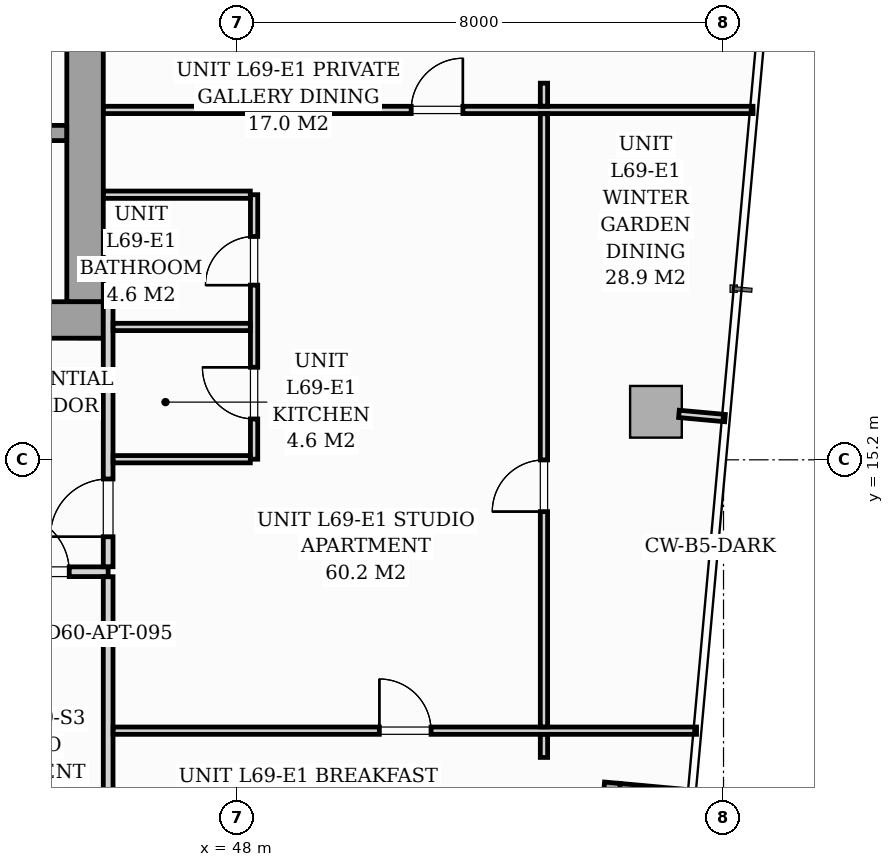
"""IFC4 building model, lengths in metres.
Left out: names, types, materials, properties, quantities, classifications, styles, units other than length and angle.
Written with IfcOpenShell. Run it as: python <this file> out.ifc"""

import sys

from ifc_helpers import new_model, si_unit, direction, frame, frame_2d, origin, origin_2d, place, context, subcontext, project, spatial, rectangle, i_section, extrude, source, transform, mapped, element, fill, save


model = new_model("IFC4")
c1 = context("Model", 3, precision=1e-05, world=origin(), true_north=direction((0.0, 1.0)))
c2 = subcontext(c1, "Body", "Model", "MODEL_VIEW")
j1 = project(units=[si_unit("LENGTHUNIT", "METRE"), si_unit("PLANEANGLEUNIT", "RADIAN")], contexts=[c1])
p1 = place(None, origin())
s1 = spatial("IfcSite", under=j1, at=p1, CompositionType="ELEMENT")
p2 = place(p1, origin())
s2 = spatial("IfcBuilding", under=s1, at=p2, CompositionType="ELEMENT")
p3 = place(p2, frame((0.0, 0.0, 239.7)))
s3 = spatial("IfcBuildingStorey", under=s2, at=p3, CompositionType="ELEMENT", Elevation=239.7)
m1 = source(origin(), c2, "Body", "SweptSolid", [
    extrude(i_section(OverallWidth=0.409, OverallDepth=0.425, WebThickness=0.033, FlangeThickness=0.052, FilletRadius=0.018, at=origin_2d()), origin(), (0.0, 0.0, 1.0), 3.296),
])
p4 = place(p3, frame((45.6, 17.4, 0.002), z_axis=(0.0, 0.0, 1.0), x_axis=(1.0, 0.0, 0.0)))
e1 = element("IfcColumn", 1, at=p4, inside=s3, PredefinedType="PILASTER", context=c2, shape_type="MappedRepresentation", body=[
    mapped(m1, transform((0.0, 0.0, 0.0), scale=1.0)),
])
m2 = source(origin(), c2, "Body", "SweptSolid", [
    extrude(rectangle(XDim=0.85, YDim=0.85, at=origin_2d()), origin(), (0.0, 0.0, 1.0), 3.296),
])
p5 = place(p3, frame((54.889, 15.99, 0.002), z_axis=(0.0, 0.0, 1.0), x_axis=(0.995884398616, -0.090632580198, 0.0)))
e2 = element("IfcColumn", 2, at=p5, inside=s3, PredefinedType="COLUMN", context=c2, shape_type="MappedRepresentation", body=[
    mapped(m2, transform((0.0, 0.0, 0.0), scale=1.0)),
])
for number, where, z_axis, x_axis in (
    (3, (55.665, 9.623, 0.0), (0.0, 0.0, 1.0), (-0.996, 0.091, 0.0)),
    (4, (54.173, 9.889, 0.0), (0.0, 0.0, 1.0), (-0.091, -0.996, 0.0)),
):
    element("IfcWall", number, at=place(p3, frame(where, z_axis=z_axis, x_axis=x_axis)), inside=s3, PredefinedType="STANDARD", context=c2, shape_type="SweptSolid", body=[
        extrude(rectangle(XDim=1.395, YDim=0.26, at=frame_2d((0.698, 0.0))), origin(), (0.0, 0.0, 1.0), 3.04),
    ])
p6 = place(p3, frame((26.2, 17.5, 0.0), z_axis=(0.0, 0.0, 1.0), x_axis=(1.0, 0.0, 0.0)))
e5 = element("IfcWall", 5, at=p6, inside=s3, PredefinedType="SHEAR", context=c2, shape_type="SweptSolid", body=[
    extrude(rectangle(XDim=19.6, YDim=0.6, at=frame_2d((9.8, 0.0))), origin(), (0.0, 0.0, 1.0), 3.3),
])
p7 = place(p6, frame((0.95, 0.0, 0.0)))
e6 = element("IfcOpeningElement", 6, at=p7, cuts=e5, PredefinedType="OPENING", context=c2, shape_type="SweptSolid", body=[
    extrude(rectangle(XDim=0.95, YDim=2.06, at=frame_2d((0.475, 1.03))), frame((0.0, 0.31, 0.0), z_axis=(0.0, -1.0, 0.0), x_axis=(1.0, 0.0, 0.0)), (0.0, 0.0, 1.0), 0.62),
])
p8 = place(p6, frame((9.38, 0.0, 0.0)))
e7 = element("IfcOpeningElement", 7, at=p8, cuts=e5, PredefinedType="OPENING", context=c2, shape_type="SweptSolid", body=[
    extrude(rectangle(XDim=0.85, YDim=2.0, at=frame_2d((0.425, 1.0))), frame((0.0, 0.31, 0.0), z_axis=(0.0, -1.0, 0.0), x_axis=(1.0, 0.0, 0.0)), (0.0, 0.0, 1.0), 0.62),
])
p9 = place(p6, frame((17.55, 0.0, 0.0)))
e8 = element("IfcOpeningElement", 8, at=p9, cuts=e5, PredefinedType="OPENING", context=c2, shape_type="SweptSolid", body=[
    extrude(rectangle(XDim=0.95, YDim=2.06, at=frame_2d((0.475, 1.03))), frame((0.0, 0.31, 0.0), z_axis=(0.0, -1.0, 0.0), x_axis=(1.0, 0.0, 0.0)), (0.0, 0.0, 1.0), 0.62),
])
p10 = place(p3, frame((45.5, 17.802, 0.0), z_axis=(0.0, 0.0, 1.0), x_axis=(0.0, 1.0, 0.0)))
e9 = element("IfcWall", 9, at=p10, inside=s3, PredefinedType="SHEAR", context=c2, shape_type="SweptSolid", body=[
    extrude(rectangle(XDim=5.796, YDim=0.6, at=frame_2d((2.898, 0.0))), origin(), (0.0, 0.0, 1.0), 3.3),
])
p11 = place(p3, frame((37.05, 20.575, 0.0), z_axis=(0.0, 0.0, 1.0), x_axis=(1.0, 0.0, 0.0)))
e10 = element("IfcWall", 10, at=p11, inside=s3, PredefinedType="SOLIDWALL", context=c2, shape_type="SweptSolid", body=[
    extrude(rectangle(XDim=8.148, YDim=0.25, at=frame_2d((4.074, 0.0))), origin(), (0.0, 0.0, 1.0), 3.3),
])
p12 = place(p11, frame((6.6, 0.0, 0.0)))
e11 = element("IfcOpeningElement", 11, at=p12, cuts=e10, PredefinedType="OPENING", context=c2, shape_type="SweptSolid", body=[
    extrude(rectangle(XDim=0.95, YDim=2.06, at=frame_2d((0.475, 1.03))), frame((0.0, 0.135, 0.0), z_axis=(0.0, -1.0, 0.0), x_axis=(1.0, 0.0, 0.0)), (0.0, 0.0, 1.0), 0.27),
])
p13 = place(p3, frame((26.12, 13.36, 0.0), z_axis=(0.0, 0.0, 1.0), x_axis=(1.0, 0.0, 0.0)))
e12 = element("IfcWall", 12, at=p13, inside=s3, PredefinedType="PARTITIONING", context=c2, shape_type="SweptSolid", body=[
    extrude(rectangle(XDim=19.76, YDim=0.16, at=frame_2d((9.88, 0.0))), origin(), (0.0, 0.0, 1.0), 2.605),
])
p14 = place(p13, frame((5.221, 0.0, 0.0)))
e13 = element("IfcOpeningElement", 13, at=p14, cuts=e12, PredefinedType="OPENING", context=c2, shape_type="SweptSolid", body=[
    extrude(rectangle(XDim=0.95, YDim=2.06, at=frame_2d((0.475, 1.03))), frame((0.0, 0.09, 0.0), z_axis=(0.0, -1.0, 0.0), x_axis=(1.0, 0.0, 0.0)), (0.0, 0.0, 1.0), 0.18),
])
p15 = place(p13, frame((8.074, 0.0, 0.0)))
e14 = element("IfcOpeningElement", 14, at=p15, cuts=e12, PredefinedType="OPENING", context=c2, shape_type="SweptSolid", body=[
    extrude(rectangle(XDim=0.95, YDim=2.06, at=frame_2d((0.475, 1.03))), frame((0.0, 0.09, 0.0), z_axis=(0.0, -1.0, 0.0), x_axis=(1.0, 0.0, 0.0)), (0.0, 0.0, 1.0), 0.18),
])
p16 = place(p13, frame((18.17, 0.0, 0.0)))
e15 = element("IfcOpeningElement", 15, at=p16, cuts=e12, PredefinedType="OPENING", context=c2, shape_type="SweptSolid", body=[
    extrude(rectangle(XDim=0.95, YDim=2.06, at=frame_2d((0.475, 1.03))), frame((0.0, 0.09, 0.0), z_axis=(0.0, -1.0, 0.0), x_axis=(1.0, 0.0, 0.0)), (0.0, 0.0, 1.0), 0.18),
])
p17 = place(p3, frame((45.88, 8.136, 0.0), z_axis=(0.0, 0.0, 1.0), x_axis=(0.0, 1.0, 0.0)))
e16 = element("IfcWall", 16, at=p17, inside=s3, PredefinedType="PARTITIONING", context=c2, shape_type="SweptSolid", body=[
    extrude(rectangle(XDim=5.142, YDim=0.16, at=frame_2d((2.571, 0.0))), origin(), (0.0, 0.0, 1.0), 3.04),
])
p18 = place(p3, frame((45.88, 13.442, 0.0), z_axis=(0.0, 0.0, 1.0), x_axis=(0.0, 1.0, 0.0)))
e17 = element("IfcWall", 17, at=p18, inside=s3, PredefinedType="PARTITIONING", context=c2, shape_type="SweptSolid", body=[
    extrude(rectangle(XDim=4.36, YDim=0.16, at=frame_2d((2.18, 0.0))), origin(), (0.0, 0.0, 1.0), 3.04),
])
p19 = place(p18, frame((0.493, 0.0, 0.0)))
e18 = element("IfcOpeningElement", 18, at=p19, cuts=e17, PredefinedType="OPENING", context=c2, shape_type="SweptSolid", body=[
    extrude(rectangle(XDim=0.95, YDim=2.06, at=frame_2d((0.475, 1.03))), frame((0.0, 0.09, 0.0), z_axis=(0.0, -1.0, 0.0), x_axis=(1.0, 0.0, 0.0)), (0.0, 0.0, 1.0), 0.18),
])
p20 = place(p3, frame((48.28, 15.21, 0.0), z_axis=(0.0, 0.0, 1.0), x_axis=(0.0, 1.0, 0.0)))
e19 = element("IfcWall", 19, at=p20, inside=s3, PredefinedType="PARTITIONING", context=c2, shape_type="SweptSolid", body=[
    extrude(rectangle(XDim=4.35, YDim=0.12, at=frame_2d((2.175, 0.0))), origin(), (0.0, 0.0, 1.0), 3.04),
])
p21 = place(p20, frame((0.662, 0.0, 0.0)))
e20 = element("IfcOpeningElement", 20, at=p21, cuts=e19, PredefinedType="OPENING", context=c2, shape_type="SweptSolid", body=[
    extrude(rectangle(XDim=0.85, YDim=2.05, at=frame_2d((0.425, 1.025))), frame((0.0, 0.07, 0.0), z_axis=(0.0, -1.0, 0.0), x_axis=(1.0, 0.0, 0.0)), (0.0, 0.0, 1.0), 0.14),
])
p22 = place(p20, frame((2.863, 0.0, 0.0)))
e21 = element("IfcOpeningElement", 21, at=p22, cuts=e19, PredefinedType="OPENING", context=c2, shape_type="SweptSolid", body=[
    extrude(rectangle(XDim=0.8, YDim=2.02, at=frame_2d((0.4, 1.01))), frame((0.0, 0.07, 0.0), z_axis=(0.0, -1.0, 0.0), x_axis=(1.0, 0.0, 0.0)), (0.0, 0.0, 1.0), 0.14),
])
p23 = place(p3, frame((45.962, 17.385, 0.0), z_axis=(0.0, 0.0, 1.0), x_axis=(1.0, 0.0, 0.0)))
e22 = element("IfcWall", 22, at=p23, inside=s3, PredefinedType="PARTITIONING", context=c2, shape_type="SweptSolid", body=[
    extrude(rectangle(XDim=2.256, YDim=0.12, at=frame_2d((1.128, 0.0))), origin(), (0.0, 0.0, 1.0), 2.381),
])
p24 = place(p3, frame((45.962, 15.21, 0.0), z_axis=(0.0, 0.0, 1.0), x_axis=(1.0, 0.0, 0.0)))
e23 = element("IfcWall", 23, at=p24, inside=s3, PredefinedType="PARTITIONING", context=c2, shape_type="SweptSolid", body=[
    extrude(rectangle(XDim=2.256, YDim=0.12, at=frame_2d((1.128, 0.0))), origin(), (0.0, 0.0, 1.0), 3.04),
])
p25 = place(p3, frame((45.802, 19.56, 0.0), z_axis=(0.0, 0.0, 1.0), x_axis=(1.0, 0.0, 0.0)))
e24 = element("IfcWall", 24, at=p25, inside=s3, PredefinedType="PARTITIONING", context=c2, shape_type="SweptSolid", body=[
    extrude(rectangle(XDim=2.416, YDim=0.12, at=frame_2d((1.208, 0.0))), origin(), (0.0, 0.0, 1.0), 3.04),
])
p26 = place(p3, frame((45.962, 10.746, 0.0), z_axis=(0.0, 0.0, 1.0), x_axis=(1.0, 0.0, 0.0)))
e25 = element("IfcWall", 25, at=p26, inside=s3, PredefinedType="PARTITIONING", context=c2, shape_type="SweptSolid", body=[
    extrude(rectangle(XDim=9.594, YDim=0.12, at=frame_2d((4.797, 0.0))), origin(), (0.0, 0.0, 1.0), 3.04),
])
p27 = place(p26, frame((4.378, 0.0, 0.0)))
e26 = element("IfcOpeningElement", 26, at=p27, cuts=e25, PredefinedType="OPENING", context=c2, shape_type="SweptSolid", body=[
    extrude(rectangle(XDim=0.85, YDim=2.05, at=frame_2d((0.425, 1.025))), frame((0.0, 0.07, 0.0), z_axis=(0.0, -1.0, 0.0), x_axis=(1.0, 0.0, 0.0)), (0.0, 0.0, 1.0), 0.14),
])
p28 = place(p3, frame((45.802, 20.954, 0.0), z_axis=(0.0, 0.0, 1.0), x_axis=(1.0, 0.0, 0.0)))
e27 = element("IfcWall", 27, at=p28, inside=s3, PredefinedType="PARTITIONING", context=c2, shape_type="SweptSolid", body=[
    extrude(rectangle(XDim=10.683, YDim=0.12, at=frame_2d((5.342, 0.0))), origin(), (0.0, 0.0, 1.0), 3.04),
])
p29 = place(p28, frame((5.062, 0.0, 0.0)))
e28 = element("IfcOpeningElement", 28, at=p29, cuts=e27, PredefinedType="OPENING", context=c2, shape_type="SweptSolid", body=[
    extrude(rectangle(XDim=0.85, YDim=2.05, at=frame_2d((0.425, 1.025))), frame((0.0, 0.07, 0.0), z_axis=(0.0, -1.0, 0.0), x_axis=(1.0, 0.0, 0.0)), (0.0, 0.0, 1.0), 0.14),
])
p30 = place(p3, frame((53.047, 10.306, 0.0), z_axis=(0.0, 0.0, 1.0), x_axis=(0.0, 1.0, 0.0)))
e29 = element("IfcWall", 29, at=p30, inside=s3, PredefinedType="PARTITIONING", context=c2, shape_type="SweptSolid", body=[
    extrude(rectangle(XDim=0.378, YDim=0.12, at=frame_2d((0.189, 0.0))), origin(), (0.0, 0.0, 1.0), 3.04),
])
p31 = place(p3, frame((53.047, 10.808, 0.0), z_axis=(0.0, 0.0, 1.0), x_axis=(0.0, 1.0, 0.0)))
e30 = element("IfcWall", 30, at=p31, inside=s3, PredefinedType="PARTITIONING", context=c2, shape_type="SweptSolid", body=[
    extrude(rectangle(XDim=10.084, YDim=0.12, at=frame_2d((5.042, 0.0))), origin(), (0.0, 0.0, 1.0), 3.04),
])
p32 = place(p31, frame((3.54, 0.0, 0.0)))
e31 = element("IfcOpeningElement", 31, at=p32, cuts=e30, PredefinedType="OPENING", context=c2, shape_type="SweptSolid", body=[
    extrude(rectangle(XDim=0.85, YDim=2.05, at=frame_2d((0.425, 1.025))), frame((0.0, 0.07, 0.0), z_axis=(0.0, -1.0, 0.0), x_axis=(1.0, 0.0, 0.0)), (0.0, 0.0, 1.0), 0.14),
])
p33 = place(p3, frame((53.047, 21.016, 0.0), z_axis=(0.0, 0.0, 1.0), x_axis=(0.0, 1.0, 0.0)))
e32 = element("IfcWall", 32, at=p33, inside=s3, PredefinedType="PARTITIONING", context=c2, shape_type="SweptSolid", body=[
    extrude(rectangle(XDim=0.378, YDim=0.12, at=frame_2d((0.189, 0.0))), origin(), (0.0, 0.0, 1.0), 3.04),
])
p34 = place(p3, frame((55.267, 15.955, 0.0), z_axis=(0.0, 0.0, 1.0), x_axis=(0.995887938321, -0.09059367697, 0.0)))
e33 = element("IfcWall", 33, at=p34, inside=s3, PredefinedType="PARTITIONING", context=c2, shape_type="SweptSolid", body=[
    extrude(rectangle(XDim=0.76, YDim=0.12, at=frame_2d((0.38, 0.0))), origin(), (0.0, 0.0, 1.0), 3.04),
])
m3 = source(origin(), c2, "Body", "SweptSolid", [
    extrude(rectangle(XDim=0.95, YDim=2.06, at=frame_2d((0.475, 1.03))), frame((0.0, 0.025, 0.0), z_axis=(0.0, -1.0, 0.0), x_axis=(1.0, 0.0, 0.0)), (0.0, 0.0, 1.0), 0.05),
])
p35 = place(p16, origin())
e34 = element("IfcDoor", 34, at=p35, inside=s3, OperationType="SINGLE_SWING_LEFT", PredefinedType="DOOR", context=c2, shape_type="MappedRepresentation", body=[
    mapped(m3, transform((0.0, 0.0, 0.0), scale=1.0)),
])
fill(e15, e34)
p36 = place(p19, origin())
e35 = element("IfcDoor", 35, at=p36, inside=s3, OperationType="SINGLE_SWING_LEFT", PredefinedType="DOOR", context=c2, shape_type="MappedRepresentation", body=[
    mapped(m3, transform((0.0, 0.0, 0.0), scale=1.0)),
])
fill(e18, e35)
m4 = source(origin(), c2, "Body", "SweptSolid", [
    extrude(rectangle(XDim=0.85, YDim=2.05, at=frame_2d((0.425, 1.025))), frame((0.0, 0.025, 0.0), z_axis=(0.0, -1.0, 0.0), x_axis=(1.0, 0.0, 0.0)), (0.0, 0.0, 1.0), 0.05),
])
p37 = place(p21, origin())
e36 = element("IfcDoor", 36, at=p37, inside=s3, OperationType="SINGLE_SWING_RIGHT", PredefinedType="DOOR", context=c2, shape_type="MappedRepresentation", body=[
    mapped(m4, transform((0.0, 0.0, 0.0), scale=1.0)),
])
fill(e20, e36)
m5 = source(origin(), c2, "Body", "SweptSolid", [
    extrude(rectangle(XDim=0.8, YDim=2.02, at=frame_2d((0.4, 1.01))), frame((0.0, 0.025, 0.0), z_axis=(0.0, -1.0, 0.0), x_axis=(1.0, 0.0, 0.0)), (0.0, 0.0, 1.0), 0.05),
])
p38 = place(p22, origin())
e37 = element("IfcDoor", 37, at=p38, inside=s3, OperationType="SINGLE_SWING_LEFT", PredefinedType="DOOR", context=c2, shape_type="MappedRepresentation", body=[
    mapped(m5, transform((0.0, 0.0, 0.0), scale=1.0)),
])
fill(e21, e37)
p39 = place(p27, origin())
e38 = element("IfcDoor", 38, at=p39, inside=s3, OperationType="SINGLE_SWING_LEFT", PredefinedType="DOOR", context=c2, shape_type="MappedRepresentation", body=[
    mapped(m4, transform((0.0, 0.0, 0.0), scale=1.0)),
])
fill(e26, e38)
p40 = place(p29, origin())
e39 = element("IfcDoor", 39, at=p40, inside=s3, OperationType="SINGLE_SWING_RIGHT", PredefinedType="DOOR", context=c2, shape_type="MappedRepresentation", body=[
    mapped(m4, transform((0.0, 0.0, 0.0), scale=1.0)),
])
fill(e28, e39)
p41 = place(p32, origin())
e40 = element("IfcDoor", 40, at=p41, inside=s3, OperationType="SINGLE_SWING_LEFT", PredefinedType="DOOR", context=c2, shape_type="MappedRepresentation", body=[
    mapped(m4, transform((0.0, 0.0, 0.0), scale=1.0)),
])
fill(e31, e40)
save(model, sys.argv[1])
